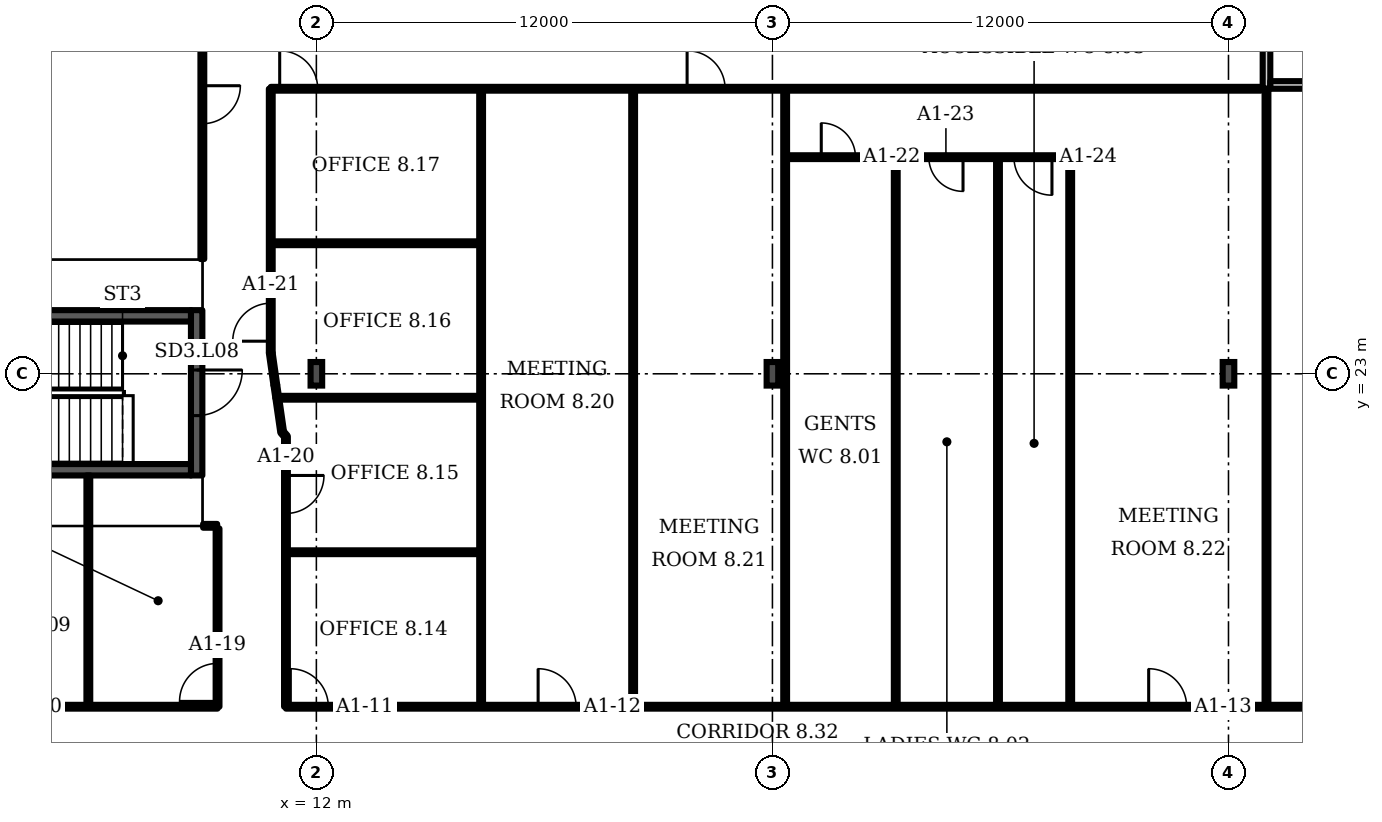
"""IFC4 building model, lengths in metres.
Left out: names, types, materials, properties, quantities, classifications, styles, units other than length and angle.
Written with IfcOpenShell. Run it as: python <this file> out.ifc"""

import sys

from ifc_helpers import new_model, si_unit, direction, frame, frame_2d, origin, origin_2d, place, context, subcontext, project, spatial, rectangle, i_section, extrude, element, fill, save


model = new_model("IFC4")
c1 = context("Model", 3, precision=1e-05, world=origin(), true_north=direction((0.0, 1.0)))
c2 = subcontext(c1, "Body", "Model", "MODEL_VIEW")
j1 = project(units=[si_unit("LENGTHUNIT", "METRE"), si_unit("PLANEANGLEUNIT", "RADIAN")], contexts=[c1])
p1 = place(None, origin())
s1 = spatial("IfcSite", under=j1, at=p1, CompositionType="ELEMENT")
p2 = place(p1, origin())
s2 = spatial("IfcBuilding", under=s1, at=p2, CompositionType="ELEMENT")
p3 = place(p2, frame((0.0, 0.0, 48.7)))
s3 = spatial("IfcBuildingStorey", under=s2, at=p3, CompositionType="ELEMENT", Elevation=48.7)
for number, where, z_axis, x_axis in (
    (1, (12.0, 23.0, 0.0), (0.0, 0.0, 1.0), (1.0, 0.0, 0.0)),
    (2, (24.0, 23.0, 0.0), (0.0, 0.0, 1.0), (1.0, 0.0, 0.0)),
    (3, (36.0, 23.0, 0.0), (0.0, 0.0, 1.0), (1.0, 0.0, 0.0)),
):
    element("IfcColumn", number, at=place(p3, frame(where, z_axis=z_axis, x_axis=x_axis)), inside=s3, PredefinedType="COLUMN", context=c2, shape_type="SweptSolid", body=[
        extrude(i_section(OverallWidth=0.305, OverallDepth=0.62, WebThickness=0.021, FlangeThickness=0.04, FilletRadius=0.027, at=origin_2d()), origin(), (0.0, 0.0, 1.0), 3.6),
    ])
p4 = place(p3, frame((37.0, 30.5, 0.0), z_axis=(0.0, 0.0, 1.0), x_axis=(0.0, 1.0, 0.0)))
e4 = element("IfcWall", 4, at=p4, inside=s3, PredefinedType="PARTITIONING", context=c2, shape_type="SweptSolid", body=[
    extrude(rectangle(XDim=3.5, YDim=0.2, at=frame_2d((1.75, 0.0))), origin(), (0.0, 0.0, 1.0), 3.2),
])
p5 = place(p4, frame((1.2, 0.0, 0.0)))
e5 = element("IfcOpeningElement", 5, at=p5, cuts=e4, PredefinedType="OPENING", context=c2, shape_type="SweptSolid", body=[
    extrude(rectangle(XDim=1.1, YDim=2.1, at=frame_2d((0.55, 1.05))), frame((0.0, 0.11, 0.0), z_axis=(0.0, -1.0, 0.0), x_axis=(1.0, 0.0, 0.0)), (0.0, 0.0, 1.0), 0.22),
])
p6 = place(p3, frame((37.1, 30.6, 0.0), z_axis=(0.0, 0.0, 1.0), x_axis=(1.0, 0.0, 0.0)))
e6 = element("IfcWall", 6, at=p6, inside=s3, PredefinedType="PARTITIONING", context=c2, shape_type="SweptSolid", body=[
    extrude(rectangle(XDim=2.8, YDim=0.2, at=frame_2d((1.4, 0.0))), origin(), (0.0, 0.0, 1.0), 3.2),
])
p7 = place(p3, frame((8.85, 20.325, 0.0), z_axis=(0.0, 0.0, 1.0), x_axis=(0.0, 1.0, 0.0)))
e7 = element("IfcWall", 7, at=p7, inside=s3, PredefinedType="SHEAR", context=c2, shape_type="SweptSolid", body=[
    extrude(rectangle(XDim=4.35, YDim=0.3, at=frame_2d((2.175, 0.0))), origin(), (0.0, 0.0, 1.0), 3.2),
])
p8 = place(p7, frame((1.575, 0.0, 0.0)))
e8 = element("IfcOpeningElement", 8, at=p8, cuts=e7, PredefinedType="OPENING", context=c2, shape_type="SweptSolid", body=[
    extrude(rectangle(XDim=1.2, YDim=2.1, at=frame_2d((0.6, 1.05))), frame((0.0, 0.16, 0.0), z_axis=(0.0, -1.0, 0.0), x_axis=(1.0, 0.0, 0.0)), (0.0, 0.0, 1.0), 0.32),
])
p9 = place(p3, frame((0.02, 14.24, 0.0), z_axis=(0.0, 0.0, 1.0), x_axis=(1.0, 0.0, 0.0)))
e9 = element("IfcWall", 9, at=p9, inside=s3, PredefinedType="PARTITIONING", context=c2, shape_type="SweptSolid", body=[
    extrude(rectangle(XDim=9.38, YDim=0.1, at=frame_2d((4.69, 0.0))), origin(), (0.0, 0.0, 1.0), 3.2),
])
p10 = place(p9, frame((2.56, 0.0, 0.0)))
e10 = element("IfcOpeningElement", 10, at=p10, cuts=e9, PredefinedType="OPENING", context=c2, shape_type="SweptSolid", body=[
    extrude(rectangle(XDim=1.0, YDim=2.1, at=frame_2d((0.5, 1.05))), frame((0.0, 0.06, 0.0), z_axis=(0.0, -1.0, 0.0), x_axis=(1.0, 0.0, 0.0)), (0.0, 0.0, 1.0), 0.12),
])
p11 = place(p3, frame((6.0, 14.24, 0.0), z_axis=(0.0, 0.0, 1.0), x_axis=(0.0, 1.0, 0.0)))
e11 = element("IfcWall", 11, at=p11, inside=s3, PredefinedType="PARTITIONING", context=c2, shape_type="SweptSolid", body=[
    extrude(rectangle(XDim=6.085, YDim=0.1, at=frame_2d((3.042, 0.0))), origin(), (0.0, 0.0, 1.0), 3.2),
])
p12 = place(p3, frame((9.0, 26.02, 0.0), z_axis=(0.0, 0.0, 1.0), x_axis=(0.0, 1.0, 0.0)))
e12 = element("IfcWall", 12, at=p12, inside=s3, PredefinedType="PARTITIONING", context=c2, shape_type="SweptSolid", body=[
    extrude(rectangle(XDim=7.96, YDim=0.1, at=frame_2d((3.98, 0.0))), origin(), (0.0, 0.0, 1.0), 3.2),
])
p13 = place(p12, frame((3.56, 0.0, 0.0)))
e13 = element("IfcOpeningElement", 13, at=p13, cuts=e12, PredefinedType="OPENING", context=c2, shape_type="SweptSolid", body=[
    extrude(rectangle(XDim=1.0, YDim=2.1, at=frame_2d((0.5, 1.05))), frame((0.0, 0.06, 0.0), z_axis=(0.0, -1.0, 0.0), x_axis=(1.0, 0.0, 0.0)), (0.0, 0.0, 1.0), 0.12),
])
p14 = place(p3, frame((9.02, 19.0, 0.0), z_axis=(0.0, 0.0, 1.0), x_axis=(1.0, 0.0, 0.0)))
e14 = element("IfcWall", 14, at=p14, inside=s3, PredefinedType="PARTITIONING", context=c2, shape_type="SweptSolid", body=[
    extrude(rectangle(XDim=0.37, YDim=0.1, at=frame_2d((0.185, 0.0))), origin(), (0.0, 0.0, 1.0), 3.2),
])
p15 = place(p3, frame((9.4, 14.24, 0.0), z_axis=(0.0, 0.0, 1.0), x_axis=(0.0, 1.0, 0.0)))
e15 = element("IfcWall", 15, at=p15, inside=s3, PredefinedType="PARTITIONING", context=c2, shape_type="SweptSolid", body=[
    extrude(rectangle(XDim=4.69, YDim=0.1, at=frame_2d((2.345, 0.0))), origin(), (0.0, 0.0, 1.0), 3.2),
])
p16 = place(p15, frame((0.14, 0.0, 0.0)))
e16 = element("IfcOpeningElement", 16, at=p16, cuts=e15, PredefinedType="OPENING", context=c2, shape_type="SweptSolid", body=[
    extrude(rectangle(XDim=1.0, YDim=2.1, at=frame_2d((0.5, 1.05))), frame((0.0, 0.06, 0.0), z_axis=(0.0, -1.0, 0.0), x_axis=(1.0, 0.0, 0.0)), (0.0, 0.0, 1.0), 0.12),
])
p17 = place(p3, frame((10.8, 23.55, 0.0), z_axis=(0.0, 0.0, 1.0), x_axis=(0.0, 1.0, 0.0)))
e17 = element("IfcWall", 17, at=p17, inside=s3, PredefinedType="PARTITIONING", context=c2, shape_type="SweptSolid", body=[
    extrude(rectangle(XDim=6.95, YDim=0.1, at=frame_2d((3.475, 0.0))), origin(), (0.0, 0.0, 1.0), 3.2),
])
p18 = place(p17, frame((0.308, 0.0, 0.0)))
e18 = element("IfcOpeningElement", 18, at=p18, cuts=e17, PredefinedType="OPENING", context=c2, shape_type="SweptSolid", body=[
    extrude(rectangle(XDim=1.0, YDim=2.1, at=frame_2d((0.5, 1.05))), frame((0.0, 0.06, 0.0), z_axis=(0.0, -1.0, 0.0), x_axis=(1.0, 0.0, 0.0)), (0.0, 0.0, 1.0), 0.12),
])
p19 = place(p3, frame((10.8, 26.435, 0.0), z_axis=(0.0, 0.0, 1.0), x_axis=(1.0, 0.0, 0.0)))
e19 = element("IfcWall", 19, at=p19, inside=s3, PredefinedType="PARTITIONING", context=c2, shape_type="SweptSolid", body=[
    extrude(rectangle(XDim=5.535, YDim=0.1, at=frame_2d((2.768, 0.0))), origin(), (0.0, 0.0, 1.0), 3.2),
])
p20 = place(p3, frame((10.8, 30.5, 0.0), z_axis=(0.0, 0.0, 1.0), x_axis=(1.0, 0.0, 0.0)))
e20 = element("IfcWall", 20, at=p20, inside=s3, PredefinedType="PARTITIONING", context=c2, shape_type="SweptSolid", body=[
    extrude(rectangle(XDim=26.05, YDim=0.1, at=frame_2d((13.025, 0.0))), origin(), (0.0, 0.0, 1.0), 3.2),
])
p21 = place(p20, frame((0.235, 0.0, 0.0)))
e21 = element("IfcOpeningElement", 21, at=p21, cuts=e20, PredefinedType="OPENING", context=c2, shape_type="SweptSolid", body=[
    extrude(rectangle(XDim=1.0, YDim=2.1, at=frame_2d((0.5, 1.05))), frame((0.0, 0.06, 0.0), z_axis=(0.0, -1.0, 0.0), x_axis=(1.0, 0.0, 0.0)), (0.0, 0.0, 1.0), 0.12),
])
p22 = place(p20, frame((10.955, 0.0, 0.0)))
e22 = element("IfcOpeningElement", 22, at=p22, cuts=e20, PredefinedType="OPENING", context=c2, shape_type="SweptSolid", body=[
    extrude(rectangle(XDim=1.0, YDim=2.1, at=frame_2d((0.5, 1.05))), frame((0.0, 0.06, 0.0), z_axis=(0.0, -1.0, 0.0), x_axis=(1.0, 0.0, 0.0)), (0.0, 0.0, 1.0), 0.12),
])
p23 = place(p3, frame((10.92, 22.705, 0.0), z_axis=(0.0, 0.0, 1.0), x_axis=(-0.14046, 0.990086, 0.0)))
e23 = element("IfcWall", 23, at=p23, inside=s3, PredefinedType="PARTITIONING", context=c2, shape_type="SweptSolid", body=[
    extrude(rectangle(XDim=0.854, YDim=0.1, at=frame_2d((0.427, 0.0))), origin(), (0.0, 0.0, 1.0), 3.2),
])
p24 = place(p3, frame((10.97, 22.37, 0.0), z_axis=(0.0, 0.0, 1.0), x_axis=(-0.147776, 0.989018, 0.0)))
e24 = element("IfcWall", 24, at=p24, inside=s3, PredefinedType="PARTITIONING", context=c2, shape_type="SweptSolid", body=[
    extrude(rectangle(XDim=0.339, YDim=0.1, at=frame_2d((0.169, 0.0))), origin(), (0.0, 0.0, 1.0), 3.2),
])
p25 = place(p3, frame((10.97, 22.37, 0.0), z_axis=(0.0, 0.0, 1.0), x_axis=(1.0, 0.0, 0.0)))
e25 = element("IfcWall", 25, at=p25, inside=s3, PredefinedType="PARTITIONING", context=c2, shape_type="SweptSolid", body=[
    extrude(rectangle(XDim=5.365, YDim=0.1, at=frame_2d((2.683, 0.0))), origin(), (0.0, 0.0, 1.0), 3.2),
])
p26 = place(p3, frame((11.1, 21.465, 0.0), z_axis=(0.0, 0.0, 1.0), x_axis=(-0.142318, 0.989818, 0.0)))
e26 = element("IfcWall", 26, at=p26, inside=s3, PredefinedType="PARTITIONING", context=c2, shape_type="SweptSolid", body=[
    extrude(rectangle(XDim=0.914, YDim=0.1, at=frame_2d((0.457, 0.0))), origin(), (0.0, 0.0, 1.0), 3.2),
])
p27 = place(p3, frame((11.2, 14.24, 0.0), z_axis=(0.0, 0.0, 1.0), x_axis=(0.0, 1.0, 0.0)))
e27 = element("IfcWall", 27, at=p27, inside=s3, PredefinedType="PARTITIONING", context=c2, shape_type="SweptSolid", body=[
    extrude(rectangle(XDim=7.11, YDim=0.1, at=frame_2d((3.555, 0.0))), origin(), (0.0, 0.0, 1.0), 3.2),
])
p28 = place(p27, frame((5.085, 0.0, 0.0)))
e28 = element("IfcOpeningElement", 28, at=p28, cuts=e27, PredefinedType="OPENING", context=c2, shape_type="SweptSolid", body=[
    extrude(rectangle(XDim=1.0, YDim=2.1, at=frame_2d((0.5, 1.05))), frame((0.0, 0.06, 0.0), z_axis=(0.0, -1.0, 0.0), x_axis=(1.0, 0.0, 0.0)), (0.0, 0.0, 1.0), 0.12),
])
p29 = place(p3, frame((11.2, 14.24, 0.0), z_axis=(0.0, 0.0, 1.0), x_axis=(1.0, 0.0, 0.0)))
e29 = element("IfcWall", 29, at=p29, inside=s3, PredefinedType="PARTITIONING", context=c2, shape_type="SweptSolid", body=[
    extrude(rectangle(XDim=51.635, YDim=0.1, at=frame_2d((25.817, 0.0))), origin(), (0.0, 0.0, 1.0), 3.2),
])
p30 = place(p29, frame((0.115, 0.0, 0.0)))
e30 = element("IfcOpeningElement", 30, at=p30, cuts=e29, PredefinedType="OPENING", context=c2, shape_type="SweptSolid", body=[
    extrude(rectangle(XDim=1.0, YDim=2.1, at=frame_2d((0.5, 1.05))), frame((0.0, 0.06, 0.0), z_axis=(0.0, -1.0, 0.0), x_axis=(1.0, 0.0, 0.0)), (0.0, 0.0, 1.0), 0.12),
])
p31 = place(p29, frame((6.635, 0.0, 0.0)))
e31 = element("IfcOpeningElement", 31, at=p31, cuts=e29, PredefinedType="OPENING", context=c2, shape_type="SweptSolid", body=[
    extrude(rectangle(XDim=1.0, YDim=2.1, at=frame_2d((0.5, 1.05))), frame((0.0, 0.06, 0.0), z_axis=(0.0, -1.0, 0.0), x_axis=(1.0, 0.0, 0.0)), (0.0, 0.0, 1.0), 0.12),
])
p32 = place(p29, frame((22.7, 0.0, 0.0)))
e32 = element("IfcOpeningElement", 32, at=p32, cuts=e29, PredefinedType="OPENING", context=c2, shape_type="SweptSolid", body=[
    extrude(rectangle(XDim=1.0, YDim=2.1, at=frame_2d((0.5, 1.05))), frame((0.0, 0.06, 0.0), z_axis=(0.0, -1.0, 0.0), x_axis=(1.0, 0.0, 0.0)), (0.0, 0.0, 1.0), 0.12),
])
p33 = place(p29, frame((27.865, 0.0, 0.0)))
e33 = element("IfcOpeningElement", 33, at=p33, cuts=e29, PredefinedType="OPENING", context=c2, shape_type="SweptSolid", body=[
    extrude(rectangle(XDim=1.0, YDim=2.1, at=frame_2d((0.5, 1.05))), frame((0.0, 0.06, 0.0), z_axis=(0.0, -1.0, 0.0), x_axis=(1.0, 0.0, 0.0)), (0.0, 0.0, 1.0), 0.12),
])
p34 = place(p29, frame((34.065, 0.0, 0.0)))
e34 = element("IfcOpeningElement", 34, at=p34, cuts=e29, PredefinedType="OPENING", context=c2, shape_type="SweptSolid", body=[
    extrude(rectangle(XDim=1.8, YDim=2.1, at=frame_2d((0.9, 1.05))), frame((0.0, 0.06, 0.0), z_axis=(0.0, -1.0, 0.0), x_axis=(1.0, 0.0, 0.0)), (0.0, 0.0, 1.0), 0.12),
])
p35 = place(p29, frame((41.765, 0.0, 0.0)))
e35 = element("IfcOpeningElement", 35, at=p35, cuts=e29, PredefinedType="OPENING", context=c2, shape_type="SweptSolid", body=[
    extrude(rectangle(XDim=1.8, YDim=2.1, at=frame_2d((0.9, 1.05))), frame((0.0, 0.06, 0.0), z_axis=(0.0, -1.0, 0.0), x_axis=(1.0, 0.0, 0.0)), (0.0, 0.0, 1.0), 0.12),
])
p36 = place(p3, frame((11.2, 18.305, 0.0), z_axis=(0.0, 0.0, 1.0), x_axis=(1.0, 0.0, 0.0)))
e36 = element("IfcWall", 36, at=p36, inside=s3, PredefinedType="PARTITIONING", context=c2, shape_type="SweptSolid", body=[
    extrude(rectangle(XDim=5.135, YDim=0.1, at=frame_2d((2.567, 0.0))), origin(), (0.0, 0.0, 1.0), 3.2),
])
p37 = place(p3, frame((11.2, 21.35, 0.0), z_axis=(0.0, 0.0, 1.0), x_axis=(-0.65566, 0.755051, 0.0)))
e37 = element("IfcWall", 37, at=p37, inside=s3, PredefinedType="PARTITIONING", context=c2, shape_type="SweptSolid", body=[
    extrude(rectangle(XDim=0.152, YDim=0.1, at=frame_2d((0.076, 0.0))), origin(), (0.0, 0.0, 1.0), 3.2),
])
for number, where, z_axis, x_axis in (
    (38, (16.335, 14.24, 0.0), (0.0, 0.0, 1.0), (0.0, 1.0, 0.0)),
    (39, (20.335, 14.24, 0.0), (0.0, 0.0, 1.0), (0.0, 1.0, 0.0)),
):
    element("IfcWall", number, at=place(p3, frame(where, z_axis=z_axis, x_axis=x_axis)), inside=s3, PredefinedType="PARTITIONING", context=c2, shape_type="SweptSolid", body=[
        extrude(rectangle(XDim=16.26, YDim=0.1, at=frame_2d((8.13, 0.0))), origin(), (0.0, 0.0, 1.0), 3.2),
    ])
p38 = place(p3, frame((24.335, 14.24, 0.0), z_axis=(0.0, 0.0, 1.0), x_axis=(0.0, 1.0, 0.0)))
e40 = element("IfcWall", 40, at=p38, inside=s3, PredefinedType="PARTITIONING", context=c2, shape_type="SweptSolid", body=[
    extrude(rectangle(XDim=16.25, YDim=0.1, at=frame_2d((8.125, 0.0))), origin(), (0.0, 0.0, 1.0), 3.2),
])
p39 = place(p3, frame((24.335, 28.7, 0.0), z_axis=(0.0, 0.0, 1.0), x_axis=(1.0, 0.0, 0.0)))
e41 = element("IfcWall", 41, at=p39, inside=s3, PredefinedType="PARTITIONING", context=c2, shape_type="SweptSolid", body=[
    extrude(rectangle(XDim=7.5, YDim=0.1, at=frame_2d((3.75, 0.0))), origin(), (0.0, 0.0, 1.0), 3.2),
])
p40 = place(p39, frame((0.95, 0.0, 0.0)))
e42 = element("IfcOpeningElement", 42, at=p40, cuts=e41, PredefinedType="OPENING", context=c2, shape_type="SweptSolid", body=[
    extrude(rectangle(XDim=0.9, YDim=2.1, at=frame_2d((0.45, 1.05))), frame((0.0, 0.06, 0.0), z_axis=(0.0, -1.0, 0.0), x_axis=(1.0, 0.0, 0.0)), (0.0, 0.0, 1.0), 0.12),
])
p41 = place(p39, frame((3.78, 0.0, 0.0)))
e43 = element("IfcOpeningElement", 43, at=p41, cuts=e41, PredefinedType="OPENING", context=c2, shape_type="SweptSolid", body=[
    extrude(rectangle(XDim=0.9, YDim=2.1, at=frame_2d((0.45, 1.05))), frame((0.0, 0.06, 0.0), z_axis=(0.0, -1.0, 0.0), x_axis=(1.0, 0.0, 0.0)), (0.0, 0.0, 1.0), 0.12),
])
p42 = place(p39, frame((6.02, 0.0, 0.0)))
e44 = element("IfcOpeningElement", 44, at=p42, cuts=e41, PredefinedType="OPENING", context=c2, shape_type="SweptSolid", body=[
    extrude(rectangle(XDim=1.0, YDim=2.1, at=frame_2d((0.5, 1.05))), frame((0.0, 0.06, 0.0), z_axis=(0.0, -1.0, 0.0), x_axis=(1.0, 0.0, 0.0)), (0.0, 0.0, 1.0), 0.12),
])
for number, where, z_axis, x_axis in (
    (45, (27.245, 14.24, 0.0), (0.0, 0.0, 1.0), (0.0, 1.0, 0.0)),
    (46, (29.935, 14.24, 0.0), (0.0, 0.0, 1.0), (0.0, 1.0, 0.0)),
    (47, (31.835, 14.24, 0.0), (0.0, 0.0, 1.0), (0.0, 1.0, 0.0)),
):
    element("IfcWall", number, at=place(p3, frame(where, z_axis=z_axis, x_axis=x_axis)), inside=s3, PredefinedType="PARTITIONING", context=c2, shape_type="SweptSolid", body=[
        extrude(rectangle(XDim=14.46, YDim=0.1, at=frame_2d((7.23, 0.0))), origin(), (0.0, 0.0, 1.0), 3.2),
    ])
p43 = place(p3, frame((37.0, 14.24, 0.0), z_axis=(0.0, 0.0, 1.0), x_axis=(0.0, 1.0, 0.0)))
e48 = element("IfcWall", 48, at=p43, inside=s3, PredefinedType="PARTITIONING", context=c2, shape_type="SweptSolid", body=[
    extrude(rectangle(XDim=16.26, YDim=0.1, at=frame_2d((8.13, 0.0))), origin(), (0.0, 0.0, 1.0), 3.2),
])
for number, where, z_axis, x_axis in (
    (49, (1.2, 20.475, 0.0), (0.0, 0.0, 1.0), (1.0, 0.0, 0.0)),
    (50, (1.2, 24.525, 0.0), (0.0, 0.0, 1.0), (1.0, 0.0, 0.0)),
):
    element("IfcWall", number, at=place(p3, frame(where, z_axis=z_axis, x_axis=x_axis)), inside=s3, PredefinedType="SHEAR", context=c2, shape_type="SweptSolid", body=[
        extrude(rectangle(XDim=7.5, YDim=0.3, at=frame_2d((3.75, 0.0))), origin(), (0.0, 0.0, 1.0), 3.2),
    ])
p44 = place(p8, origin())
e51 = element("IfcDoor", 51, at=p44, inside=s3, OperationType="SINGLE_SWING_RIGHT", PredefinedType="DOOR", context=c2, shape_type="SweptSolid", body=[
    extrude(rectangle(XDim=1.2, YDim=2.1, at=frame_2d((0.6, 1.05))), frame((0.0, 0.025, 0.0), z_axis=(0.0, -1.0, 0.0), x_axis=(1.0, 0.0, 0.0)), (0.0, 0.0, 1.0), 0.05),
])
fill(e8, e51)
p45 = place(p30, origin())
e52 = element("IfcDoor", 52, at=p45, inside=s3, OperationType="SINGLE_SWING_LEFT", PredefinedType="DOOR", context=c2, shape_type="SweptSolid", body=[
    extrude(rectangle(XDim=1.0, YDim=2.1, at=frame_2d((0.5, 1.05))), frame((0.0, 0.025, 0.0), z_axis=(0.0, -1.0, 0.0), x_axis=(1.0, 0.0, 0.0)), (0.0, 0.0, 1.0), 0.05),
])
fill(e30, e52)
p46 = place(p31, origin())
e53 = element("IfcDoor", 53, at=p46, inside=s3, OperationType="SINGLE_SWING_LEFT", PredefinedType="DOOR", context=c2, shape_type="SweptSolid", body=[
    extrude(rectangle(XDim=1.0, YDim=2.1, at=frame_2d((0.5, 1.05))), frame((0.0, 0.025, 0.0), z_axis=(0.0, -1.0, 0.0), x_axis=(1.0, 0.0, 0.0)), (0.0, 0.0, 1.0), 0.05),
])
fill(e31, e53)
p47 = place(p32, origin())
e54 = element("IfcDoor", 54, at=p47, inside=s3, OperationType="SINGLE_SWING_LEFT", PredefinedType="DOOR", context=c2, shape_type="SweptSolid", body=[
    extrude(rectangle(XDim=1.0, YDim=2.1, at=frame_2d((0.5, 1.05))), frame((0.0, 0.025, 0.0), z_axis=(0.0, -1.0, 0.0), x_axis=(1.0, 0.0, 0.0)), (0.0, 0.0, 1.0), 0.05),
])
fill(e32, e54)
p48 = place(p16, origin())
e55 = element("IfcDoor", 55, at=p48, inside=s3, OperationType="SINGLE_SWING_LEFT", PredefinedType="DOOR", context=c2, shape_type="SweptSolid", body=[
    extrude(rectangle(XDim=1.0, YDim=2.1, at=frame_2d((0.5, 1.05))), frame((0.0, 0.025, 0.0), z_axis=(0.0, -1.0, 0.0), x_axis=(1.0, 0.0, 0.0)), (0.0, 0.0, 1.0), 0.05),
])
fill(e16, e55)
p49 = place(p28, origin())
e56 = element("IfcDoor", 56, at=p49, inside=s3, OperationType="SINGLE_SWING_RIGHT", PredefinedType="DOOR", context=c2, shape_type="SweptSolid", body=[
    extrude(rectangle(XDim=1.0, YDim=2.1, at=frame_2d((0.5, 1.05))), frame((0.0, 0.025, 0.0), z_axis=(0.0, -1.0, 0.0), x_axis=(1.0, 0.0, 0.0)), (0.0, 0.0, 1.0), 0.05),
])
fill(e28, e56)
p50 = place(p18, origin())
e57 = element("IfcDoor", 57, at=p50, inside=s3, OperationType="SINGLE_SWING_LEFT", PredefinedType="DOOR", context=c2, shape_type="SweptSolid", body=[
    extrude(rectangle(XDim=1.0, YDim=2.1, at=frame_2d((0.5, 1.05))), frame((0.0, 0.025, 0.0), z_axis=(0.0, -1.0, 0.0), x_axis=(1.0, 0.0, 0.0)), (0.0, 0.0, 1.0), 0.05),
])
fill(e18, e57)
p51 = place(p40, origin())
e58 = element("IfcDoor", 58, at=p51, inside=s3, OperationType="SINGLE_SWING_LEFT", PredefinedType="DOOR", context=c2, shape_type="SweptSolid", body=[
    extrude(rectangle(XDim=0.9, YDim=2.1, at=frame_2d((0.45, 1.05))), frame((0.0, 0.025, 0.0), z_axis=(0.0, -1.0, 0.0), x_axis=(1.0, 0.0, 0.0)), (0.0, 0.0, 1.0), 0.05),
])
fill(e42, e58)
p52 = place(p41, origin())
e59 = element("IfcDoor", 59, at=p52, inside=s3, OperationType="SINGLE_SWING_RIGHT", PredefinedType="DOOR", context=c2, shape_type="SweptSolid", body=[
    extrude(rectangle(XDim=0.9, YDim=2.1, at=frame_2d((0.45, 1.05))), frame((0.0, 0.025, 0.0), z_axis=(0.0, -1.0, 0.0), x_axis=(1.0, 0.0, 0.0)), (0.0, 0.0, 1.0), 0.05),
])
fill(e43, e59)
p53 = place(p42, origin())
e60 = element("IfcDoor", 60, at=p53, inside=s3, OperationType="SINGLE_SWING_RIGHT", PredefinedType="DOOR", context=c2, shape_type="SweptSolid", body=[
    extrude(rectangle(XDim=1.0, YDim=2.1, at=frame_2d((0.5, 1.05))), frame((0.0, 0.025, 0.0), z_axis=(0.0, -1.0, 0.0), x_axis=(1.0, 0.0, 0.0)), (0.0, 0.0, 1.0), 0.05),
])
fill(e44, e60)
p54 = place(p13, origin())
e61 = element("IfcDoor", 61, at=p54, inside=s3, OperationType="SINGLE_SWING_RIGHT", PredefinedType="DOOR", context=c2, shape_type="SweptSolid", body=[
    extrude(rectangle(XDim=1.0, YDim=2.1, at=frame_2d((0.5, 1.05))), frame((0.0, 0.025, 0.0), z_axis=(0.0, -1.0, 0.0), x_axis=(1.0, 0.0, 0.0)), (0.0, 0.0, 1.0), 0.05),
])
fill(e13, e61)
p55 = place(p21, origin())
e62 = element("IfcDoor", 62, at=p55, inside=s3, OperationType="SINGLE_SWING_LEFT", PredefinedType="DOOR", context=c2, shape_type="SweptSolid", body=[
    extrude(rectangle(XDim=1.0, YDim=2.1, at=frame_2d((0.5, 1.05))), frame((0.0, 0.025, 0.0), z_axis=(0.0, -1.0, 0.0), x_axis=(1.0, 0.0, 0.0)), (0.0, 0.0, 1.0), 0.05),
])
fill(e21, e62)
p56 = place(p22, origin())
e63 = element("IfcDoor", 63, at=p56, inside=s3, OperationType="SINGLE_SWING_LEFT", PredefinedType="DOOR", context=c2, shape_type="SweptSolid", body=[
    extrude(rectangle(XDim=1.0, YDim=2.1, at=frame_2d((0.5, 1.05))), frame((0.0, 0.025, 0.0), z_axis=(0.0, -1.0, 0.0), x_axis=(1.0, 0.0, 0.0)), (0.0, 0.0, 1.0), 0.05),
])
fill(e22, e63)
save(model, sys.argv[1])
